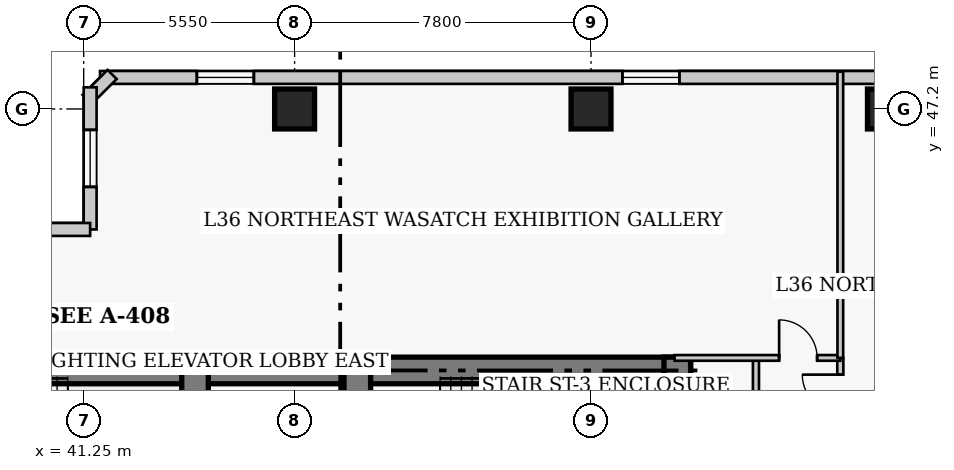
"""IFC4 building model, lengths in metres.
Left out: names, types, materials, properties, quantities, classifications, styles, units other than length and angle.
Written with IfcOpenShell. Run it as: python <this file> out.ifc"""

import sys

from ifc_helpers import new_model, si_unit, direction, frame, frame_2d, origin, origin_2d, place, context, subcontext, project, spatial, rectangle, extrude, element, fill, save


model = new_model("IFC4")
c1 = context("Model", 3, precision=1e-05, world=origin(), true_north=direction((0.0, 1.0)))
c2 = subcontext(c1, "Body", "Model", "MODEL_VIEW")
j1 = project(units=[si_unit("LENGTHUNIT", "METRE"), si_unit("PLANEANGLEUNIT", "RADIAN")], contexts=[c1])
p1 = place(None, origin())
s1 = spatial("IfcSite", under=j1, at=p1, CompositionType="ELEMENT")
p2 = place(p1, origin())
s2 = spatial("IfcBuilding", under=s1, at=p2, CompositionType="ELEMENT")
p3 = place(p2, frame((0.0, 0.0, 146.0)))
s3 = spatial("IfcBuildingStorey", under=s2, at=p3, CompositionType="ELEMENT", Elevation=146.0)
p4 = place(p3, frame((35.85, 40.32, 0.0), z_axis=(0.0, 0.0, 1.0), x_axis=(1.0, 0.0, 0.0)))
e1 = element("IfcWall", 1, at=p4, inside=s3, PredefinedType="SHEAR", context=c2, shape_type="SweptSolid", body=[
    extrude(rectangle(XDim=12.6, YDim=0.7, at=frame_2d((6.3, 0.0))), origin(), (0.0, 0.0, 1.0), 3.8),
])
p5 = place(p3, frame((48.45, 40.32, 0.0), z_axis=(0.0, 0.0, 1.0), x_axis=(1.0, 0.0, 0.0)))
e2 = element("IfcWall", 2, at=p5, inside=s3, PredefinedType="SHEAR", context=c2, shape_type="SweptSolid", body=[
    extrude(rectangle(XDim=8.77, YDim=0.7, at=frame_2d((4.385, 0.0))), origin(), (0.0, 0.0, 1.0), 3.8),
])
p6 = place(p3, frame((56.87, 27.05, 0.0), z_axis=(0.0, 0.0, 1.0), x_axis=(0.0, 1.0, 0.0)))
e3 = element("IfcWall", 3, at=p6, inside=s3, PredefinedType="SHEAR", context=c2, shape_type="SweptSolid", body=[
    extrude(rectangle(XDim=13.62, YDim=0.7, at=frame_2d((6.81, 0.0))), origin(), (0.0, 0.0, 1.0), 3.8),
])
p7 = place(p3, frame((44.18, 36.37, 0.0), z_axis=(0.0, 0.0, 1.0), x_axis=(0.0, 1.0, 0.0)))
e4 = element("IfcWall", 4, at=p7, inside=s3, PredefinedType="SHEAR", context=c2, shape_type="SweptSolid", body=[
    extrude(rectangle(XDim=3.95, YDim=0.7, at=frame_2d((1.975, 0.0))), origin(), (0.0, 0.0, 1.0), 3.8),
])
p8 = place(p3, frame((48.45, 32.4, 0.0), z_axis=(0.0, 0.0, 1.0), x_axis=(0.0, 1.0, 0.0)))
e5 = element("IfcWall", 5, at=p8, inside=s3, PredefinedType="SHEAR", context=c2, shape_type="SweptSolid", body=[
    extrude(rectangle(XDim=7.92, YDim=0.7, at=frame_2d((3.96, 0.0))), origin(), (0.0, 0.0, 1.0), 3.8),
])
p9 = place(p8, frame((5.8, 0.0, 0.0)))
e6 = element("IfcOpeningElement", 6, at=p9, cuts=e5, PredefinedType="OPENING", context=c2, shape_type="SweptSolid", body=[
    extrude(rectangle(XDim=1.1, YDim=2.15, at=frame_2d((0.55, 1.075))), frame((0.0, 0.36, 0.0), z_axis=(0.0, -1.0, 0.0), x_axis=(1.0, 0.0, 0.0)), (0.0, 0.0, 1.0), 0.72),
])
for number, where, z_axis, x_axis in (
    (7, (46.8, 47.2, 0.0), (0.0, 0.0, 1.0), (1.0, 0.0, 0.0)),
    (8, (54.6, 47.2, 0.0), (0.0, 0.0, 1.0), (1.0, 0.0, 0.0)),
    (9, (62.4, 47.2, 0.0), (0.0, 0.0, 1.0), (1.0, 0.0, 0.0)),
):
    element("IfcColumn", number, at=place(p3, frame(where, z_axis=z_axis, x_axis=x_axis)), inside=s3, PredefinedType="COLUMN", context=c2, shape_type="SweptSolid", body=[
        extrude(rectangle(XDim=1.05, YDim=1.05, at=origin_2d()), origin(), (0.0, 0.0, 1.0), 3.8),
    ])
p10 = place(p3, frame((68.37, 48.03, 0.0), z_axis=(0.0, 0.0, 1.0), x_axis=(-1.0, 0.0, 0.0)))
e10 = element("IfcWall", 10, at=p10, inside=s3, PredefinedType="SOLIDWALL", context=c2, shape_type="SweptSolid", body=[
    extrude(rectangle(XDim=26.69, YDim=0.34, at=frame_2d((13.345, 0.0))), origin(), (0.0, 0.0, 1.0), 3.55),
])
p11 = place(p10, frame((3.048, 0.0, 0.85)))
e11 = element("IfcOpeningElement", 11, at=p11, cuts=e10, PredefinedType="OPENING", context=c2, shape_type="SweptSolid", body=[
    extrude(rectangle(XDim=1.5, YDim=1.75, at=frame_2d((0.75, 0.875))), frame((0.0, 0.18, 0.0), z_axis=(0.0, -1.0, 0.0), x_axis=(1.0, 0.0, 0.0)), (0.0, 0.0, 1.0), 0.36),
])
p12 = place(p10, frame((11.445, 0.0, 0.85)))
e12 = element("IfcOpeningElement", 12, at=p12, cuts=e10, PredefinedType="OPENING", context=c2, shape_type="SweptSolid", body=[
    extrude(rectangle(XDim=1.5, YDim=1.75, at=frame_2d((0.75, 0.875))), frame((0.0, 0.18, 0.0), z_axis=(0.0, -1.0, 0.0), x_axis=(1.0, 0.0, 0.0)), (0.0, 0.0, 1.0), 0.36),
])
p13 = place(p10, frame((22.642, 0.0, 0.85)))
e13 = element("IfcOpeningElement", 13, at=p13, cuts=e10, PredefinedType="OPENING", context=c2, shape_type="SweptSolid", body=[
    extrude(rectangle(XDim=1.5, YDim=1.75, at=frame_2d((0.75, 0.875))), frame((0.0, 0.18, 0.0), z_axis=(0.0, -1.0, 0.0), x_axis=(1.0, 0.0, 0.0)), (0.0, 0.0, 1.0), 0.36),
])
p14 = place(p3, frame((41.999, 48.108, 0.0), z_axis=(0.0, 0.0, 1.0), x_axis=(-0.707106781187, -0.707106781187, 0.0)))
e14 = element("IfcWall", 14, at=p14, inside=s3, PredefinedType="SOLIDWALL", context=c2, shape_type="SweptSolid", body=[
    extrude(rectangle(XDim=0.929, YDim=0.34, at=frame_2d((0.464, 0.0))), origin(), (0.0, 0.0, 1.0), 3.55),
])
p15 = place(p3, frame((41.42, 47.77, 0.0), z_axis=(0.0, 0.0, 1.0), x_axis=(0.0, -1.0, 0.0)))
e15 = element("IfcWall", 15, at=p15, inside=s3, PredefinedType="SOLIDWALL", context=c2, shape_type="SweptSolid", body=[
    extrude(rectangle(XDim=3.74, YDim=0.34, at=frame_2d((1.87, 0.0))), origin(), (0.0, 0.0, 1.0), 3.55),
])
p16 = place(p15, frame((1.12, 0.0, 0.85)))
e16 = element("IfcOpeningElement", 16, at=p16, cuts=e15, PredefinedType="OPENING", context=c2, shape_type="SweptSolid", body=[
    extrude(rectangle(XDim=1.5, YDim=1.75, at=frame_2d((0.75, 0.875))), frame((0.0, 0.18, 0.0), z_axis=(0.0, -1.0, 0.0), x_axis=(1.0, 0.0, 0.0)), (0.0, 0.0, 1.0), 0.36),
])
p17 = place(p3, frame((41.42, 44.03, 0.0), z_axis=(0.0, 0.0, 1.0), x_axis=(-1.0, 0.0, 0.0)))
e17 = element("IfcWall", 17, at=p17, inside=s3, PredefinedType="SOLIDWALL", context=c2, shape_type="SweptSolid", body=[
    extrude(rectangle(XDim=4.84, YDim=0.34, at=frame_2d((2.42, 0.0))), origin(), (0.0, 0.0, 1.0), 3.55),
])
p18 = place(p17, frame((1.67, 0.0, 0.85)))
e18 = element("IfcOpeningElement", 18, at=p18, cuts=e17, PredefinedType="OPENING", context=c2, shape_type="SweptSolid", body=[
    extrude(rectangle(XDim=1.5, YDim=1.75, at=frame_2d((0.75, 0.875))), frame((0.0, 0.18, 0.0), z_axis=(0.0, -1.0, 0.0), x_axis=(1.0, 0.0, 0.0)), (0.0, 0.0, 1.0), 0.36),
])
p19 = place(p3, frame((61.16, 12.05, 0.0), z_axis=(0.0, 0.0, 1.0), x_axis=(0.0, 1.0, 0.0)))
e19 = element("IfcWall", 19, at=p19, inside=s3, PredefinedType="PARTITIONING", context=c2, shape_type="SweptSolid", body=[
    extrude(rectangle(XDim=28.6, YDim=0.16, at=frame_2d((14.3, 0.0))), origin(), (0.0, 0.0, 1.0), 3.55),
])
p20 = place(p19, frame((3.5, 0.0, 0.0)))
e20 = element("IfcOpeningElement", 20, at=p20, cuts=e19, PredefinedType="OPENING", context=c2, shape_type="SweptSolid", body=[
    extrude(rectangle(XDim=0.95, YDim=2.1, at=frame_2d((0.475, 1.05))), frame((0.0, 0.09, 0.0), z_axis=(0.0, -1.0, 0.0), x_axis=(1.0, 0.0, 0.0)), (0.0, 0.0, 1.0), 0.18),
])
p21 = place(p19, frame((9.758, 0.0, 0.0)))
e21 = element("IfcOpeningElement", 21, at=p21, cuts=e19, PredefinedType="OPENING", context=c2, shape_type="SweptSolid", body=[
    extrude(rectangle(XDim=0.95, YDim=2.1, at=frame_2d((0.475, 1.05))), frame((0.0, 0.09, 0.0), z_axis=(0.0, -1.0, 0.0), x_axis=(1.0, 0.0, 0.0)), (0.0, 0.0, 1.0), 0.18),
])
p22 = place(p19, frame((27.16, 0.0, 0.0)))
e22 = element("IfcOpeningElement", 22, at=p22, cuts=e19, PredefinedType="OPENING", context=c2, shape_type="SweptSolid", body=[
    extrude(rectangle(XDim=1.0, YDim=2.15, at=frame_2d((0.5, 1.075))), frame((0.0, 0.09, 0.0), z_axis=(0.0, -1.0, 0.0), x_axis=(1.0, 0.0, 0.0)), (0.0, 0.0, 1.0), 0.18),
])
p23 = place(p3, frame((58.94, 19.01, 0.0), z_axis=(0.0, 0.0, 1.0), x_axis=(0.0, 1.0, 0.0)))
e23 = element("IfcWall", 23, at=p23, inside=s3, PredefinedType="PARTITIONING", context=c2, shape_type="SweptSolid", body=[
    extrude(rectangle(XDim=21.64, YDim=0.16, at=frame_2d((10.82, 0.0))), origin(), (0.0, 0.0, 1.0), 3.55),
])
p24 = place(p3, frame((56.8, 40.65, 0.0), z_axis=(0.0, 0.0, 1.0), x_axis=(1.0, 0.0, 0.0)))
e24 = element("IfcWall", 24, at=p24, inside=s3, PredefinedType="PARTITIONING", context=c2, shape_type="SweptSolid", body=[
    extrude(rectangle(XDim=4.36, YDim=0.15, at=frame_2d((2.18, 0.0))), origin(), (0.0, 0.0, 1.0), 3.55),
])
p25 = place(p24, frame((2.75, 0.0, 0.0)))
e25 = element("IfcOpeningElement", 25, at=p25, cuts=e24, PredefinedType="OPENING", context=c2, shape_type="SweptSolid", body=[
    extrude(rectangle(XDim=1.0, YDim=2.15, at=frame_2d((0.5, 1.075))), frame((0.0, 0.085, 0.0), z_axis=(0.0, -1.0, 0.0), x_axis=(1.0, 0.0, 0.0)), (0.0, 0.0, 1.0), 0.17),
])
p26 = place(p3, frame((61.16, 40.65, 0.0), z_axis=(0.0, 0.0, 1.0), x_axis=(0.0, 1.0, 0.0)))
e26 = element("IfcWall", 26, at=p26, inside=s3, PredefinedType="PARTITIONING", context=c2, shape_type="SweptSolid", body=[
    extrude(rectangle(XDim=7.53, YDim=0.15, at=frame_2d((3.765, 0.0))), origin(), (0.0, 0.0, 1.0), 3.55),
])
p27 = place(p12, origin())
e27 = element("IfcWindow", 27, at=p27, inside=s3, PartitioningType="SINGLE_PANEL", PredefinedType="WINDOW", context=c2, shape_type="SweptSolid", body=[
    extrude(rectangle(XDim=1.5, YDim=1.75, at=frame_2d((0.75, 0.875))), frame((0.0, 0.03, 0.0), z_axis=(0.0, -1.0, 0.0), x_axis=(1.0, 0.0, 0.0)), (0.0, 0.0, 1.0), 0.06),
])
fill(e12, e27)
p28 = place(p13, origin())
e28 = element("IfcWindow", 28, at=p28, inside=s3, PartitioningType="SINGLE_PANEL", PredefinedType="WINDOW", context=c2, shape_type="SweptSolid", body=[
    extrude(rectangle(XDim=1.5, YDim=1.75, at=frame_2d((0.75, 0.875))), frame((0.0, 0.03, 0.0), z_axis=(0.0, -1.0, 0.0), x_axis=(1.0, 0.0, 0.0)), (0.0, 0.0, 1.0), 0.06),
])
fill(e13, e28)
p29 = place(p16, origin())
e29 = element("IfcWindow", 29, at=p29, inside=s3, PartitioningType="SINGLE_PANEL", PredefinedType="WINDOW", context=c2, shape_type="SweptSolid", body=[
    extrude(rectangle(XDim=1.5, YDim=1.75, at=frame_2d((0.75, 0.875))), frame((0.0, 0.03, 0.0), z_axis=(0.0, -1.0, 0.0), x_axis=(1.0, 0.0, 0.0)), (0.0, 0.0, 1.0), 0.06),
])
fill(e16, e29)
p30 = place(p25, origin())
e30 = element("IfcDoor", 30, at=p30, inside=s3, OperationType="SINGLE_SWING_LEFT", PredefinedType="DOOR", context=c2, shape_type="SweptSolid", body=[
    extrude(rectangle(XDim=1.0, YDim=2.15, at=frame_2d((0.5, 1.075))), frame((0.0, 0.025, 0.0), z_axis=(0.0, -1.0, 0.0), x_axis=(1.0, 0.0, 0.0)), (0.0, 0.0, 1.0), 0.05),
])
fill(e25, e30)
p31 = place(p22, origin())
e31 = element("IfcDoor", 31, at=p31, inside=s3, OperationType="SINGLE_SWING_RIGHT", PredefinedType="DOOR", context=c2, shape_type="SweptSolid", body=[
    extrude(rectangle(XDim=1.0, YDim=2.15, at=frame_2d((0.5, 1.075))), frame((0.0, 0.025, 0.0), z_axis=(0.0, -1.0, 0.0), x_axis=(1.0, 0.0, 0.0)), (0.0, 0.0, 1.0), 0.05),
])
fill(e22, e31)
save(model, sys.argv[1])
